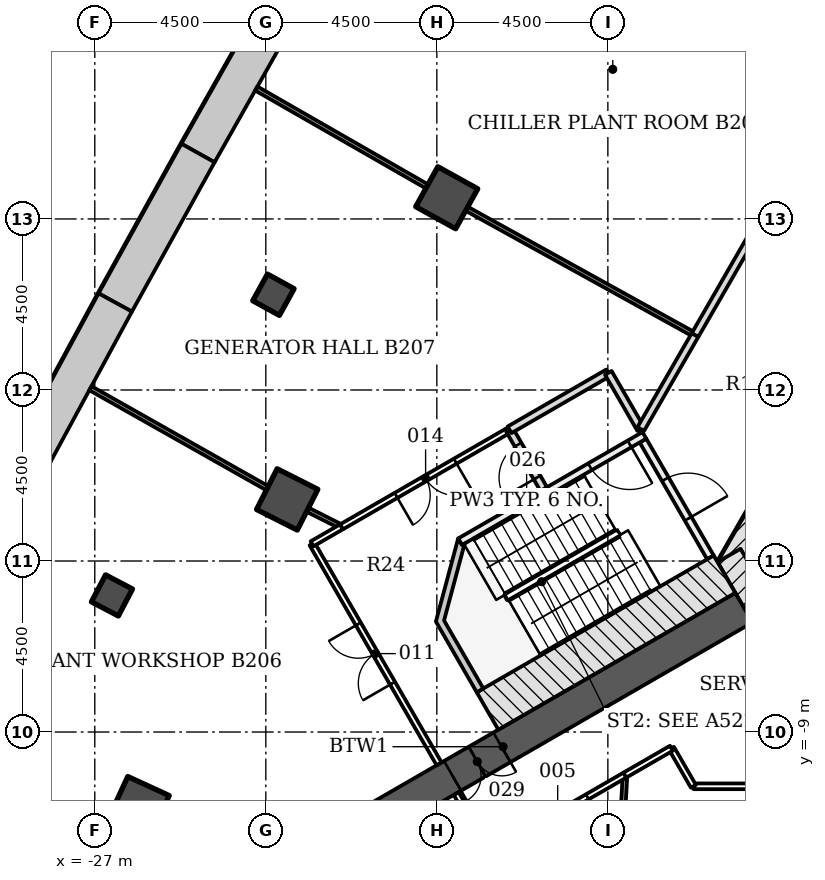
"""IFC4 building model, lengths in metres.
Left out: names, types, materials, properties, quantities, classifications, styles, units other than length and angle.
Written with IfcOpenShell. Run it as: python <this file> out.ifc"""

import sys

from ifc_helpers import new_model, si_unit, direction, frame, frame_2d, origin, origin_2d, place, context, subcontext, project, spatial, polyline, rectangle, outline, extrude, element, fill, save


model = new_model("IFC4")
c1 = context("Model", 3, precision=1e-05, world=origin(), true_north=direction((0.0, 1.0)))
c2 = subcontext(c1, "Body", "Model", "MODEL_VIEW")
j1 = project(units=[si_unit("LENGTHUNIT", "METRE"), si_unit("PLANEANGLEUNIT", "RADIAN")], contexts=[c1])
p1 = place(None, origin())
s1 = spatial("IfcSite", under=j1, at=p1, CompositionType="ELEMENT")
p2 = place(p1, origin())
s2 = spatial("IfcBuilding", under=s1, at=p2, CompositionType="ELEMENT")
p3 = place(p2, frame((0.0, 0.0, -9.0)))
s3 = spatial("IfcBuildingStorey", under=s2, at=p3, CompositionType="ELEMENT", Elevation=-9.0)
p4 = place(p3, origin())
e1 = element("IfcWall", 1, at=p4, inside=s3, PredefinedType="SOLIDWALL", context=c2, shape_type="SweptSolid", body=[
    extrude(outline(polyline([(-22.506, 10.396), (-24.721, 6.479), (-23.848, 5.99), (-21.638, 9.9), (-22.506, 10.396)])), origin(), (0.0, 0.0, 1.0), 4.2),
])
p5 = place(p3, origin())
e2 = element("IfcWall", 2, at=p5, inside=s3, PredefinedType="SOLIDWALL", context=c2, shape_type="SweptSolid", body=[
    extrude(outline(polyline([(-24.721, 6.479), (-26.901, 2.542), (-26.024, 2.062), (-23.848, 5.99), (-24.721, 6.479)])), origin(), (0.0, 0.0, 1.0), 4.2),
])
p6 = place(p3, origin())
e3 = element("IfcWall", 3, at=p6, inside=s3, PredefinedType="SOLIDWALL", context=c2, shape_type="SweptSolid", body=[
    extrude(outline(polyline([(-26.901, 2.542), (-29.045, -1.415), (-28.164, -1.887), (-26.024, 2.062), (-26.901, 2.542)])), origin(), (0.0, 0.0, 1.0), 4.2),
])
for number, where, z_axis, x_axis in (
    (4, (-17.739, 5.058, -0.3), (0.0, 0.0, 1.0), (-0.875, 0.484, 0.0)),
    (5, (-21.937, -2.88, -0.3), (0.0, 0.0, 1.0), (-0.893, 0.451, 0.0)),
    (6, (-25.838, -10.967, -0.3), (0.0, 0.0, 1.0), (-0.909, 0.418, 0.0)),
):
    element("IfcColumn", number, at=place(p3, frame(where, z_axis=z_axis, x_axis=x_axis)), inside=s3, PredefinedType="COLUMN", context=c2, shape_type="SweptSolid", body=[
        extrude(rectangle(XDim=1.2, YDim=1.2, at=origin_2d()), origin(), (0.0, 0.0, 1.0), 4.5),
    ])
for number, where, z_axis, x_axis in (
    (7, (-22.3, 2.506, -0.3), (0.0, 0.0, 1.0), (-0.876, 0.482, 0.0)),
    (8, (-26.548, -5.406, -0.3), (0.0, 0.0, 1.0), (-0.886, 0.464, 0.0)),
):
    element("IfcColumn", number, at=place(p3, frame(where, z_axis=z_axis, x_axis=x_axis)), inside=s3, PredefinedType="COLUMN", context=c2, shape_type="SweptSolid", body=[
        extrude(rectangle(XDim=0.8, YDim=0.8, at=origin_2d()), origin(), (0.0, 0.0, 1.0), 4.5),
    ])
p7 = place(p3, frame((-1.083, 11.281, -0.3), z_axis=(0.0, 0.0, 1.0), x_axis=(-0.500001446645, -0.866024568562, 0.0)))
e9 = element("IfcWall", 9, at=p7, inside=s3, PredefinedType="SHEAR", context=c2, shape_type="SweptSolid", body=[
    extrude(rectangle(XDim=18.458, YDim=0.7, at=frame_2d((9.229, 0.0))), origin(), (0.0, 0.0, 1.0), 4.5),
])
p8 = place(p7, frame((8.979, 0.0, 0.3)))
e10 = element("IfcOpeningElement", 10, at=p8, cuts=e9, PredefinedType="OPENING", context=c2, shape_type="SweptSolid", body=[
    extrude(rectangle(XDim=1.2, YDim=2.1, at=frame_2d((0.6, 1.05))), frame((0.0, 0.36, 0.0), z_axis=(0.0, -1.0, 0.0), x_axis=(1.0, 0.0, 0.0)), (0.0, 0.0, 1.0), 0.72),
])
p9 = place(p7, frame((11.029, 0.0, 0.3)))
e11 = element("IfcOpeningElement", 11, at=p9, cuts=e9, PredefinedType="OPENING", context=c2, shape_type="SweptSolid", body=[
    extrude(rectangle(XDim=1.2, YDim=2.1, at=frame_2d((0.6, 1.05))), frame((0.0, 0.36, 0.0), z_axis=(0.0, -1.0, 0.0), x_axis=(1.0, 0.0, 0.0)), (0.0, 0.0, 1.0), 0.72),
])
p10 = place(p3, frame((-10.311, -4.353, -0.3), z_axis=(0.0, 0.0, 1.0), x_axis=(0.500042739161, -0.866000726912, 0.0)))
e12 = element("IfcWall", 12, at=p10, inside=s3, PredefinedType="SHEAR", context=c2, shape_type="SweptSolid", body=[
    extrude(rectangle(XDim=2.771, YDim=0.7, at=frame_2d((1.386, 0.0))), origin(), (0.0, 0.0, 1.0), 4.5),
])
p11 = place(p3, frame((-9.922, -5.728, -0.3), z_axis=(0.0, 0.0, 1.0), x_axis=(-0.866028046028, -0.499995423472, 0.0)))
e13 = element("IfcWall", 13, at=p11, inside=s3, PredefinedType="SHEAR", context=c2, shape_type="SweptSolid", body=[
    extrude(rectangle(XDim=14.633, YDim=0.9, at=frame_2d((7.316, 0.0))), origin(), (0.0, 0.0, 1.0), 4.5),
])
p12 = place(p11, frame((7.35, 0.0, 0.3)))
e14 = element("IfcOpeningElement", 14, at=p12, cuts=e13, PredefinedType="OPENING", context=c2, shape_type="SweptSolid", body=[
    extrude(rectangle(XDim=1.5, YDim=2.1, at=frame_2d((0.75, 1.05))), frame((0.0, 0.46, 0.0), z_axis=(0.0, -1.0, 0.0), x_axis=(1.0, 0.0, 0.0)), (0.0, 0.0, 1.0), 0.92),
])
p13 = place(p3, frame((-12.576, -1.331, -0.3), z_axis=(0.0, 0.0, 1.0), x_axis=(0.499970499736, -0.8660424351, 0.0)))
e15 = element("IfcWall", 15, at=p13, inside=s3, PredefinedType="SHEAR", context=c2, shape_type="SweptSolid", body=[
    extrude(rectangle(XDim=3.55, YDim=0.2, at=frame_2d((1.775, 0.0))), origin(), (0.0, 0.0, 1.0), 4.5),
])
p14 = place(p13, frame((1.175, 0.0, 0.3)))
e16 = element("IfcOpeningElement", 16, at=p14, cuts=e15, PredefinedType="OPENING", context=c2, shape_type="SweptSolid", body=[
    extrude(rectangle(XDim=1.2, YDim=2.1, at=frame_2d((0.6, 1.05))), frame((0.0, 0.11, 0.0), z_axis=(0.0, -1.0, 0.0), x_axis=(1.0, 0.0, 0.0)), (0.0, 0.0, 1.0), 0.22),
])
p15 = place(p3, frame((-12.539, -1.194, -0.3), z_axis=(0.0, 0.0, 1.0), x_axis=(-0.866045472092, -0.499965239061, 0.0)))
e17 = element("IfcWall", 17, at=p15, inside=s3, PredefinedType="SHEAR", context=c2, shape_type="SweptSolid", body=[
    extrude(rectangle(XDim=5.6, YDim=0.2, at=frame_2d((2.8, 0.0))), origin(), (0.0, 0.0, 1.0), 4.5),
])
p16 = place(p15, frame((0.45, 0.0, 0.3)))
e18 = element("IfcOpeningElement", 18, at=p16, cuts=e17, PredefinedType="OPENING", context=c2, shape_type="SweptSolid", body=[
    extrude(rectangle(XDim=1.2, YDim=2.1, at=frame_2d((0.6, 1.05))), frame((0.0, 0.11, 0.0), z_axis=(0.0, -1.0, 0.0), x_axis=(1.0, 0.0, 0.0)), (0.0, 0.0, 1.0), 0.22),
])
p17 = place(p3, frame((-10.43, -4.847, -0.3), z_axis=(0.0, 0.0, 1.0), x_axis=(-0.866018442252, -0.500012057535, 0.0)))
e19 = element("IfcWall", 19, at=p17, inside=s3, PredefinedType="SHEAR", context=c2, shape_type="SweptSolid", body=[
    extrude(rectangle(XDim=7.2, YDim=1.136, at=frame_2d((3.6, 0.0))), origin(), (0.0, 0.0, 1.0), 4.5),
])
p18 = place(p3, frame((0.0, 0.0, -0.3)))
e20 = element("IfcWall", 20, at=p18, inside=s3, PredefinedType="SHEAR", context=c2, shape_type="SweptSolid", body=[
    extrude(outline(polyline([(-17.439, -3.907), (-18.025, -6.093), (-16.95, -7.955), (-16.777, -7.855), (-17.81, -6.065), (-17.267, -4.039), (-17.339, -4.081), (-17.339, -4.081), (-17.339, -4.081), (-17.339, -4.081), (-17.339, -4.081), (-17.339, -4.081), (-17.339, -4.081), (-17.339, -4.081), (-17.339, -4.081), (-17.339, -4.081), (-17.339, -4.081), (-17.339, -4.081), (-17.339, -4.081), (-17.339, -4.081), (-17.339, -4.081), (-17.339, -4.081), (-17.339, -4.081), (-17.439, -3.907)])), origin(), (0.0, 0.0, 1.0), 4.5),
])
p19 = place(p3, frame((-13.429, -16.96, 0.0), z_axis=(0.0, 0.0, 1.0), x_axis=(0.055551088657, 0.998455846069, 0.0)))
e21 = element("IfcWall", 21, at=p19, inside=s3, PredefinedType="PARTITIONING", context=c2, shape_type="SweptSolid", body=[
    extrude(rectangle(XDim=6.838, YDim=0.12, at=frame_2d((3.419, 0.0))), origin(), (0.0, 0.0, 1.0), 3.588),
])
p20 = place(p3, frame((-13.045, -10.13, 0.0), z_axis=(0.0, 0.0, 1.0), x_axis=(-0.866035577775, -0.499982377718, 0.0)))
e22 = element("IfcWall", 22, at=p20, inside=s3, PredefinedType="PARTITIONING", context=c2, shape_type="SweptSolid", body=[
    extrude(rectangle(XDim=4.093, YDim=0.15, at=frame_2d((2.046, 0.0))), origin(), (0.0, 0.0, 1.0), 3.588),
])
p21 = place(p20, frame((1.15, 0.0, 0.0)))
e23 = element("IfcOpeningElement", 23, at=p21, cuts=e22, PredefinedType="OPENING", context=c2, shape_type="SweptSolid", body=[
    extrude(rectangle(XDim=1.8, YDim=2.1, at=frame_2d((0.9, 1.05))), frame((0.0, 0.085, 0.0), z_axis=(0.0, -1.0, 0.0), x_axis=(1.0, 0.0, 0.0)), (0.0, 0.0, 1.0), 0.17),
])
p22 = place(p3, frame((-16.591, -12.176, 0.0), z_axis=(0.0, 0.0, 1.0), x_axis=(-0.499965372359, 0.866045395139, 0.0)))
e24 = element("IfcWall", 24, at=p22, inside=s3, PredefinedType="PARTITIONING", context=c2, shape_type="SweptSolid", body=[
    extrude(rectangle(XDim=1.798, YDim=0.15, at=frame_2d((0.899, 0.0))), origin(), (0.0, 0.0, 1.0), 3.588),
])
p23 = place(p3, frame((-4.347, -10.428, 0.0), z_axis=(0.0, 0.0, 1.0), x_axis=(-1.0, 0.0, 0.0)))
e25 = element("IfcWall", 25, at=p23, inside=s3, PredefinedType="PARTITIONING", context=c2, shape_type="SweptSolid", body=[
    extrude(rectangle(XDim=6.902, YDim=0.15, at=frame_2d((3.451, 0.0))), origin(), (0.0, 0.0, 1.0), 3.588),
])
p24 = place(p23, frame((2.55, 0.0, 0.0)))
e26 = element("IfcOpeningElement", 26, at=p24, cuts=e25, PredefinedType="OPENING", context=c2, shape_type="SweptSolid", body=[
    extrude(rectangle(XDim=1.8, YDim=2.1, at=frame_2d((0.9, 1.05))), frame((0.0, 0.085, 0.0), z_axis=(0.0, -1.0, 0.0), x_axis=(1.0, 0.0, 0.0)), (0.0, 0.0, 1.0), 0.17),
])
p25 = place(p3, frame((-11.249, -10.428, 0.0), z_axis=(0.0, 0.0, 1.0), x_axis=(-0.499978438088, 0.866037852202, 0.0)))
e27 = element("IfcWall", 27, at=p25, inside=s3, PredefinedType="PARTITIONING", context=c2, shape_type="SweptSolid", body=[
    extrude(rectangle(XDim=1.156, YDim=0.15, at=frame_2d((0.578, 0.0))), origin(), (0.0, 0.0, 1.0), 4.2),
])
p26 = place(p3, frame((-11.828, -9.427, 0.0), z_axis=(0.0, 0.0, 1.0), x_axis=(-0.866110865696, -0.499851946404, 0.0)))
e28 = element("IfcWall", 28, at=p26, inside=s3, PredefinedType="PARTITIONING", context=c2, shape_type="SweptSolid", body=[
    extrude(rectangle(XDim=1.415, YDim=0.15, at=frame_2d((0.707, 0.0))), origin(), (0.0, 0.0, 1.0), 3.588),
])
p27 = place(p3, frame((-17.941, -9.838, 0.0), z_axis=(0.0, 0.0, 1.0), x_axis=(-0.500048140185, 0.865997608252, 0.0)))
e29 = element("IfcWall", 29, at=p27, inside=s3, PredefinedType="PARTITIONING", context=c2, shape_type="SweptSolid", body=[
    extrude(rectangle(XDim=6.683, YDim=0.15, at=frame_2d((3.342, 0.0))), origin(), (0.0, 0.0, 1.0), 3.588),
])
p28 = place(p27, frame((2.45, 0.0, 0.0)))
e30 = element("IfcOpeningElement", 30, at=p28, cuts=e29, PredefinedType="OPENING", context=c2, shape_type="SweptSolid", body=[
    extrude(rectangle(XDim=1.8, YDim=2.1, at=frame_2d((0.9, 1.05))), frame((0.0, 0.085, 0.0), z_axis=(0.0, -1.0, 0.0), x_axis=(1.0, 0.0, 0.0)), (0.0, 0.0, 1.0), 0.17),
])
p29 = place(p3, frame((-21.283, -4.048, 0.0), z_axis=(0.0, 0.0, 1.0), x_axis=(0.865804825377, 0.500381858538, 0.0)))
e31 = element("IfcWall", 31, at=p29, inside=s3, PredefinedType="PARTITIONING", context=c2, shape_type="SweptSolid", body=[
    extrude(rectangle(XDim=0.897, YDim=0.15, at=frame_2d((0.449, 0.0))), origin(), (0.0, 0.0, 1.0), 3.588),
])
p30 = place(p3, frame((-22.461, -2.584, 0.0), z_axis=(0.0, 0.0, 1.0), x_axis=(-0.87056283872, 0.492057256668, 0.0)))
e32 = element("IfcWall", 32, at=p30, inside=s3, PredefinedType="PARTITIONING", context=c2, shape_type="SweptSolid", body=[
    extrude(rectangle(XDim=5.347, YDim=0.12, at=frame_2d((2.674, 0.0))), origin(), (0.0, 0.0, 1.0), 3.583),
])
p31 = place(p3, frame((-20.509, -3.601, 0.0), z_axis=(0.0, 0.0, 1.0), x_axis=(-0.892316605155, 0.451410097544, 0.0)))
e33 = element("IfcWall", 33, at=p31, inside=s3, PredefinedType="PARTITIONING", context=c2, shape_type="SweptSolid", body=[
    extrude(rectangle(XDim=1.0, YDim=0.12, at=frame_2d((0.5, 0.0))), origin(), (0.0, 0.0, 1.0), 3.588),
])
p32 = place(p3, frame((-16.087, -1.049, 0.0), z_axis=(0.0, 0.0, 1.0), x_axis=(-0.866071706002, -0.49991979363, 0.0)))
e34 = element("IfcWall", 34, at=p32, inside=s3, PredefinedType="PARTITIONING", context=c2, shape_type="SweptSolid", body=[
    extrude(rectangle(XDim=5.105, YDim=0.15, at=frame_2d((2.552, 0.0))), origin(), (0.0, 0.0, 1.0), 3.588),
])
p33 = place(p32, frame((1.65, 0.0, 0.0)))
e35 = element("IfcOpeningElement", 35, at=p33, cuts=e34, PredefinedType="OPENING", context=c2, shape_type="SweptSolid", body=[
    extrude(rectangle(XDim=1.8, YDim=2.1, at=frame_2d((0.9, 1.05))), frame((0.0, 0.085, 0.0), z_axis=(0.0, -1.0, 0.0), x_axis=(1.0, 0.0, 0.0)), (0.0, 0.0, 1.0), 0.17),
])
p34 = place(p3, frame((-15.188, -2.607, 0.0), z_axis=(0.0, 0.0, 1.0), x_axis=(-0.500024172624, 0.866011447264, 0.0)))
e36 = element("IfcWall", 36, at=p34, inside=s3, PredefinedType="PARTITIONING", context=c2, shape_type="SweptSolid", body=[
    extrude(rectangle(XDim=1.798, YDim=0.2, at=frame_2d((0.899, 0.0))), origin(), (0.0, 0.0, 1.0), 3.588),
])
p35 = place(p34, frame((0.35, 0.0, 0.0)))
e37 = element("IfcOpeningElement", 37, at=p35, cuts=e36, PredefinedType="OPENING", context=c2, shape_type="SweptSolid", body=[
    extrude(rectangle(XDim=1.0, YDim=2.1, at=frame_2d((0.5, 1.05))), frame((0.0, 0.11, 0.0), z_axis=(0.0, -1.0, 0.0), x_axis=(1.0, 0.0, 0.0)), (0.0, 0.0, 1.0), 0.22),
])
p36 = place(p3, frame((-16.087, -1.048, 0.0), z_axis=(0.0, 0.0, 1.0), x_axis=(0.865988915629, 0.500063194015, 0.0)))
e38 = element("IfcWall", 38, at=p36, inside=s3, PredefinedType="PARTITIONING", context=c2, shape_type="SweptSolid", body=[
    extrude(rectangle(XDim=2.998, YDim=0.2, at=frame_2d((1.499, 0.0))), origin(), (0.0, 0.0, 1.0), 3.588),
])
p37 = place(p3, frame((-13.489, 0.451, 0.0), z_axis=(0.0, 0.0, 1.0), x_axis=(0.500044178772, -0.865999895656, 0.0)))
e39 = element("IfcWall", 39, at=p37, inside=s3, PredefinedType="PARTITIONING", context=c2, shape_type="SweptSolid", body=[
    extrude(rectangle(XDim=1.708, YDim=0.2, at=frame_2d((0.854, 0.0))), origin(), (0.0, 0.0, 1.0), 4.2),
])
p38 = place(p3, frame((-12.635, -1.028, 0.0), z_axis=(0.0, 0.0, 1.0), x_axis=(0.50005725472, 0.865992345233, 0.0)))
e40 = element("IfcWall", 40, at=p38, inside=s3, PredefinedType="PARTITIONING", context=c2, shape_type="SweptSolid", body=[
    extrude(rectangle(XDim=2.862, YDim=0.2, at=frame_2d((1.431, 0.0))), origin(), (0.0, 0.0, 1.0), 3.588),
])
p39 = place(p3, frame((-18.26, 5.356, 0.0), z_axis=(0.0, 0.0, 1.0), x_axis=(-0.867438170848, 0.497544992695, 0.0)))
e41 = element("IfcWall", 41, at=p39, inside=s3, PredefinedType="PARTITIONING", context=c2, shape_type="SweptSolid", body=[
    extrude(rectangle(XDim=5.177, YDim=0.12, at=frame_2d((2.589, 0.0))), origin(), (0.0, 0.0, 1.0), 3.583),
])
p40 = place(p3, frame((-11.208, 1.446, 0.0), z_axis=(0.0, 0.0, 1.0), x_axis=(-0.875125393946, 0.483896212912, 0.0)))
e42 = element("IfcWall", 42, at=p40, inside=s3, PredefinedType="PARTITIONING", context=c2, shape_type="SweptSolid", body=[
    extrude(rectangle(XDim=6.863, YDim=0.12, at=frame_2d((3.432, 0.0))), origin(), (0.0, 0.0, 1.0), 3.588),
])
p41 = place(p3, frame((-8.256, 6.555, 0.0), z_axis=(0.0, 0.0, 1.0), x_axis=(-0.500042467634, -0.866000883696, 0.0)))
e43 = element("IfcWall", 43, at=p41, inside=s3, PredefinedType="PARTITIONING", context=c2, shape_type="SweptSolid", body=[
    extrude(rectangle(XDim=5.899, YDim=0.2, at=frame_2d((2.95, 0.0))), origin(), (0.0, 0.0, 1.0), 3.588),
])
p42 = place(p14, origin())
e44 = element("IfcDoor", 44, at=p42, inside=s3, OperationType="SINGLE_SWING_RIGHT", PredefinedType="DOOR", context=c2, shape_type="SweptSolid", body=[
    extrude(rectangle(XDim=1.2, YDim=2.1, at=frame_2d((0.6, 1.05))), frame((0.0, 0.025, 0.0), z_axis=(0.0, -1.0, 0.0), x_axis=(1.0, 0.0, 0.0)), (0.0, 0.0, 1.0), 0.05),
])
fill(e16, e44)
p43 = place(p16, origin())
e45 = element("IfcDoor", 45, at=p43, inside=s3, OperationType="SINGLE_SWING_LEFT", PredefinedType="DOOR", context=c2, shape_type="SweptSolid", body=[
    extrude(rectangle(XDim=1.2, YDim=2.1, at=frame_2d((0.6, 1.05))), frame((0.0, 0.025, 0.0), z_axis=(0.0, -1.0, 0.0), x_axis=(1.0, 0.0, 0.0)), (0.0, 0.0, 1.0), 0.05),
])
fill(e18, e45)
p44 = place(p21, origin())
e46 = element("IfcDoor", 46, at=p44, inside=s3, OperationType="DOUBLE_DOOR_SINGLE_SWING", PredefinedType="DOOR", context=c2, shape_type="SweptSolid", body=[
    extrude(rectangle(XDim=1.8, YDim=2.1, at=frame_2d((0.9, 1.05))), frame((0.0, 0.025, 0.0), z_axis=(0.0, -1.0, 0.0), x_axis=(1.0, 0.0, 0.0)), (0.0, 0.0, 1.0), 0.05),
])
fill(e23, e46)
p45 = place(p28, origin())
e47 = element("IfcDoor", 47, at=p45, inside=s3, OperationType="DOUBLE_DOOR_SINGLE_SWING", PredefinedType="DOOR", context=c2, shape_type="SweptSolid", body=[
    extrude(rectangle(XDim=1.8, YDim=2.1, at=frame_2d((0.9, 1.05))), frame((0.0, 0.025, 0.0), z_axis=(0.0, -1.0, 0.0), x_axis=(1.0, 0.0, 0.0)), (0.0, 0.0, 1.0), 0.05),
])
fill(e30, e47)
p46 = place(p33, origin())
e48 = element("IfcDoor", 48, at=p46, inside=s3, OperationType="DOUBLE_DOOR_SINGLE_SWING", PredefinedType="DOOR", context=c2, shape_type="SweptSolid", body=[
    extrude(rectangle(XDim=1.8, YDim=2.1, at=frame_2d((0.9, 1.05))), frame((0.0, 0.025, 0.0), z_axis=(0.0, -1.0, 0.0), x_axis=(1.0, 0.0, 0.0)), (0.0, 0.0, 1.0), 0.05),
])
fill(e35, e48)
p47 = place(p35, origin())
e49 = element("IfcDoor", 49, at=p47, inside=s3, OperationType="SINGLE_SWING_LEFT", PredefinedType="DOOR", context=c2, shape_type="SweptSolid", body=[
    extrude(rectangle(XDim=1.0, YDim=2.1, at=frame_2d((0.5, 1.05))), frame((0.0, 0.025, 0.0), z_axis=(0.0, -1.0, 0.0), x_axis=(1.0, 0.0, 0.0)), (0.0, 0.0, 1.0), 0.05),
])
fill(e37, e49)
p48 = place(p12, origin())
e50 = element("IfcDoor", 50, at=p48, inside=s3, OperationType="DOUBLE_DOOR_SINGLE_SWING", PredefinedType="DOOR", context=c2, shape_type="SweptSolid", body=[
    extrude(rectangle(XDim=1.5, YDim=2.1, at=frame_2d((0.75, 1.05))), frame((0.0, 0.025, 0.0), z_axis=(0.0, -1.0, 0.0), x_axis=(1.0, 0.0, 0.0)), (0.0, 0.0, 1.0), 0.05),
])
fill(e14, e50)
save(model, sys.argv[1])
